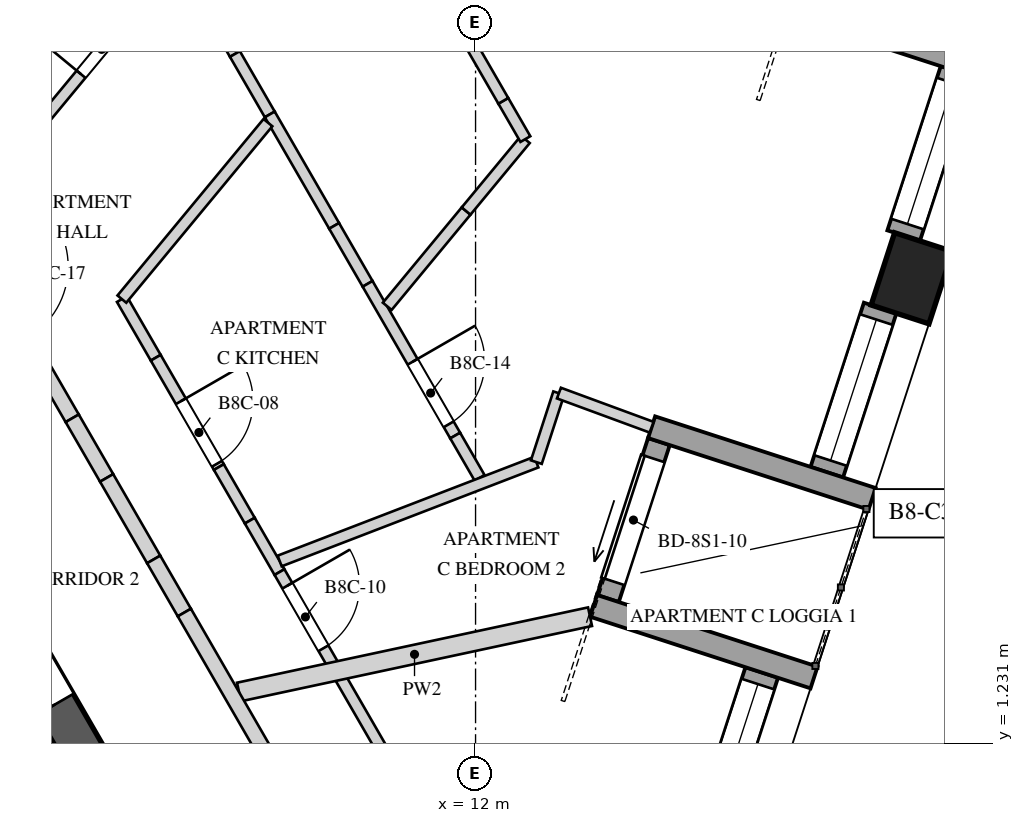
"""IFC4 building model, lengths in metres.
Left out: names, types, materials, properties, quantities, classifications, styles, units other than length and angle.
Written with IfcOpenShell. Run it as: python <this file> out.ifc"""

import sys

from ifc_helpers import new_model, si_unit, direction, frame, frame_2d, origin, origin_2d, place, context, subcontext, project, spatial, polyline, rectangle, outline, extrude, element, fill, save


model = new_model("IFC4")
c1 = context("Model", 3, precision=1e-05, world=origin(), true_north=direction((0.0, 1.0)))
c2 = subcontext(c1, "Body", "Model", "MODEL_VIEW")
j1 = project(units=[si_unit("LENGTHUNIT", "METRE"), si_unit("PLANEANGLEUNIT", "RADIAN")], contexts=[c1])
p1 = place(None, origin())
s1 = spatial("IfcSite", under=j1, at=p1, CompositionType="ELEMENT")
p2 = place(p1, origin())
s2 = spatial("IfcBuilding", under=s1, at=p2, CompositionType="ELEMENT")
p3 = place(p2, frame((0.0, 0.0, 344.4)))
s3 = spatial("IfcBuildingStorey", under=s2, at=p3, CompositionType="ELEMENT", Elevation=344.4)
p4 = place(p3, frame((9.93, -4.25, 0.0), z_axis=(0.0, 0.0, 1.0), x_axis=(-0.499994590896, 0.86602852671, 0.0)))
e1 = element("IfcWall", 1, at=p4, inside=s3, PredefinedType="SHEAR", context=c2, shape_type="SweptSolid", body=[
    extrude(rectangle(XDim=17.292, YDim=0.55, at=frame_2d((8.646, 0.0))), origin(), (0.0, 0.0, 1.0), 4.0),
])
p5 = place(p4, frame((6.921, 0.0, 0.0)))
e2 = element("IfcOpeningElement", 2, at=p5, cuts=e1, PredefinedType="OPENING", context=c2, shape_type="SweptSolid", body=[
    extrude(rectangle(XDim=1.0, YDim=2.4, at=frame_2d((0.5, 1.2))), frame((0.0, 0.285, 0.0), z_axis=(0.0, -1.0, 0.0), x_axis=(1.0, 0.0, 0.0)), (0.0, 0.0, 1.0), 0.57),
])
p6 = place(p3, frame((17.739, 7.349, 0.0), z_axis=(0.0, 0.0, 1.0), x_axis=(0.309016994375, 0.951056516295, 0.0)))
e3 = element("IfcColumn", 3, at=p6, inside=s3, PredefinedType="COLUMN", context=c2, shape_type="SweptSolid", body=[
    extrude(rectangle(XDim=1.0, YDim=0.8, at=origin_2d()), origin(), (0.0, 0.0, 1.0), 4.0),
])
p7 = place(p3, frame((15.063, 0.002, 0.0), z_axis=(0.0, 0.0, 1.0), x_axis=(0.309059334219, 0.951042758204, 0.0)))
e4 = element("IfcWall", 4, at=p7, inside=s3, PredefinedType="SOLIDWALL", context=c2, shape_type="SweptSolid", body=[
    extrude(rectangle(XDim=2.271, YDim=0.45, at=frame_2d((1.135, 0.0))), origin(), (0.0, 0.0, 1.0), 3.3),
])
p8 = place(p7, frame((0.161, 0.0, 0.4)))
e5 = element("IfcOpeningElement", 5, at=p8, cuts=e4, PredefinedType="OPENING", context=c2, shape_type="SweptSolid", body=[
    extrude(rectangle(XDim=1.95, YDim=2.75, at=frame_2d((0.975, 1.375))), frame((0.0, 0.235, 0.0), z_axis=(0.0, -1.0, 0.0), x_axis=(1.0, 0.0, 0.0)), (0.0, 0.0, 1.0), 0.47),
])
p9 = place(p3, frame((16.621, 4.798, 0.0), z_axis=(0.0, 0.0, 1.0), x_axis=(0.309027740273, 0.951053024674, 0.0)))
e6 = element("IfcWall", 6, at=p9, inside=s3, PredefinedType="SOLIDWALL", context=c2, shape_type="SweptSolid", body=[
    extrude(rectangle(XDim=2.271, YDim=0.45, at=frame_2d((1.136, 0.0))), origin(), (0.0, 0.0, 1.0), 3.3),
])
p10 = place(p9, frame((0.161, 0.0, 0.4)))
e7 = element("IfcOpeningElement", 7, at=p10, cuts=e6, PredefinedType="OPENING", context=c2, shape_type="SweptSolid", body=[
    extrude(rectangle(XDim=1.95, YDim=2.1, at=frame_2d((0.975, 1.05))), frame((0.0, 0.235, 0.0), z_axis=(0.0, -1.0, 0.0), x_axis=(1.0, 0.0, 0.0)), (0.0, 0.0, 1.0), 0.47),
])
p11 = place(p3, frame((17.632, 7.909, 0.0), z_axis=(0.0, 0.0, 1.0), x_axis=(0.309027740273, 0.951053024674, 0.0)))
e8 = element("IfcWall", 8, at=p11, inside=s3, PredefinedType="SOLIDWALL", context=c2, shape_type="SweptSolid", body=[
    extrude(rectangle(XDim=2.271, YDim=0.45, at=frame_2d((1.136, 0.0))), origin(), (0.0, 0.0, 1.0), 3.3),
])
p12 = place(p11, frame((0.161, 0.0, 0.4)))
e9 = element("IfcOpeningElement", 9, at=p12, cuts=e8, PredefinedType="OPENING", context=c2, shape_type="SweptSolid", body=[
    extrude(rectangle(XDim=1.95, YDim=2.75, at=frame_2d((0.975, 1.375))), frame((0.0, 0.235, 0.0), z_axis=(0.0, -1.0, 0.0), x_axis=(1.0, 0.0, 0.0)), (0.0, 0.0, 1.0), 0.47),
])
p13 = place(p3, frame((13.741, 3.135, 0.0), z_axis=(0.0, 0.0, 1.0), x_axis=(0.308966581759, 0.95107289487, 0.0)))
e10 = element("IfcWall", 10, at=p13, inside=s3, PredefinedType="SOLIDWALL", context=c2, shape_type="SweptSolid", body=[
    extrude(rectangle(XDim=2.171, YDim=0.3, at=frame_2d((1.086, 0.0))), origin(), (0.0, 0.0, 1.0), 3.3),
])
p14 = place(p13, frame((0.236, 0.0, 0.0)))
e11 = element("IfcOpeningElement", 11, at=p14, cuts=e10, PredefinedType="OPENING", context=c2, shape_type="SweptSolid", body=[
    extrude(rectangle(XDim=1.7, YDim=2.5, at=frame_2d((0.85, 1.25))), frame((0.0, 0.16, 0.0), z_axis=(0.0, -1.0, 0.0), x_axis=(1.0, 0.0, 0.0)), (0.0, 0.0, 1.0), 0.32),
])
for number, where, z_axis, x_axis in (
    (12, (16.453, 2.096, 0.0), (0.0, 0.0, 1.0), (-0.951, 0.309, 0.0)),
    (13, (17.217, 4.447, 0.0), (0.0, 0.0, 1.0), (-0.951, 0.309, 0.0)),
    (14, (19.022, 10.003, 0.0), (0.0, 0.0, 1.0), (-0.951, 0.309, 0.0)),
):
    element("IfcWall", number, at=place(p3, frame(where, z_axis=z_axis, x_axis=x_axis)), inside=s3, PredefinedType="SOLIDWALL", context=c2, shape_type="SweptSolid", body=[
        extrude(rectangle(XDim=3.05, YDim=0.3, at=frame_2d((1.525, 0.0))), origin(), (0.0, 0.0, 1.0), 3.3),
    ])
p15 = place(p3, frame((8.998, -4.135, 0.0), z_axis=(0.0, 0.0, 1.0), x_axis=(-0.500009909098, 0.866019682689, 0.0)))
e15 = element("IfcWall", 15, at=p15, inside=s3, PredefinedType="SOLIDWALL", context=c2, shape_type="SweptSolid", body=[
    extrude(rectangle(XDim=6.2, YDim=0.75, at=frame_2d((3.1, 0.0))), origin(), (0.0, 0.0, 1.0), 3.65),
])
p16 = place(p3, frame((6.12, 9.199, 0.0), z_axis=(0.0, 0.0, 1.0), x_axis=(0.63755942525, 0.770401180733, 0.0)))
e16 = element("IfcWall", 16, at=p16, inside=s3, PredefinedType="PARTITIONING", context=c2, shape_type="SweptSolid", body=[
    extrude(rectangle(XDim=3.014, YDim=0.15, at=frame_2d((1.507, 0.0))), origin(), (0.0, 0.0, 1.0), 3.65),
])
p17 = place(p16, frame((1.082, 0.0, 0.0)))
e17 = element("IfcOpeningElement", 17, at=p17, cuts=e16, PredefinedType="OPENING", context=c2, shape_type="SweptSolid", body=[
    extrude(rectangle(XDim=0.85, YDim=2.4, at=frame_2d((0.425, 1.2))), frame((0.0, 0.085, 0.0), z_axis=(0.0, -1.0, 0.0), x_axis=(1.0, 0.0, 0.0)), (0.0, 0.0, 1.0), 0.17),
])
p18 = place(p3, frame((7.347, 7.074, 0.0), z_axis=(0.0, 0.0, 1.0), x_axis=(0.499944022619, -0.866057719929, 0.0)))
e18 = element("IfcWall", 18, at=p18, inside=s3, PredefinedType="PARTITIONING", context=c2, shape_type="SweptSolid", body=[
    extrude(rectangle(XDim=0.89, YDim=0.15, at=frame_2d((0.445, 0.0))), origin(), (0.0, 0.0, 1.0), 3.65),
])
p19 = place(p3, frame((7.792, 6.303, 0.0), z_axis=(0.0, 0.0, 1.0), x_axis=(0.500027802648, -0.866009351323, 0.0)))
e19 = element("IfcWall", 19, at=p19, inside=s3, PredefinedType="PARTITIONING", context=c2, shape_type="SweptSolid", body=[
    extrude(outline(polyline([(0.0, 0.0), (1.661, 0.0), (1.661, 3.65), (0.881, 3.65), (0.881, 2.55), (0.0, 2.55), (0.0, 0.0)])), frame((0.0, 0.075, 0.0), z_axis=(0.0, -1.0, 0.0), x_axis=(1.0, 0.0, 0.0)), (0.0, 0.0, 1.0), 0.15),
])
p20 = place(p19, frame((0.661, 0.0, 0.0)))
e20 = element("IfcOpeningElement", 20, at=p20, cuts=e19, PredefinedType="OPENING", context=c2, shape_type="SweptSolid", body=[
    extrude(rectangle(XDim=0.95, YDim=2.4, at=frame_2d((0.475, 1.2))), frame((0.0, 0.085, 0.0), z_axis=(0.0, -1.0, 0.0), x_axis=(1.0, 0.0, 0.0)), (0.0, 0.0, 1.0), 0.17),
])
p21 = place(p3, frame((8.623, 4.865, 0.0), z_axis=(0.0, 0.0, 1.0), x_axis=(0.500042693391, -0.866000753341, 0.0)))
e21 = element("IfcWall", 21, at=p21, inside=s3, PredefinedType="PARTITIONING", context=c2, shape_type="SweptSolid", body=[
    extrude(rectangle(XDim=0.814, YDim=0.15, at=frame_2d((0.407, 0.0))), origin(), (0.0, 0.0, 1.0), 3.65),
])
p22 = place(p3, frame((9.03, 4.16, 0.0), z_axis=(0.0, 0.0, 1.0), x_axis=(0.499767520639, -0.866159584207, 0.0)))
e22 = element("IfcWall", 22, at=p22, inside=s3, PredefinedType="PARTITIONING", context=c2, shape_type="SweptSolid", body=[
    extrude(rectangle(XDim=0.781, YDim=0.15, at=frame_2d((0.391, 0.0))), origin(), (0.0, 0.0, 1.0), 2.75),
])
p23 = place(p3, frame((9.42, 3.483, 0.0), z_axis=(0.0, 0.0, 1.0), x_axis=(0.50002680699, -0.866009926209, 0.0)))
e23 = element("IfcWall", 23, at=p23, inside=s3, PredefinedType="PARTITIONING", context=c2, shape_type="SweptSolid", body=[
    extrude(rectangle(XDim=4.12, YDim=0.15, at=frame_2d((2.06, 0.0))), origin(), (0.0, 0.0, 1.0), 3.65),
])
p24 = place(p23, frame((0.207, 0.0, 0.0)))
e24 = element("IfcOpeningElement", 24, at=p24, cuts=e23, PredefinedType="OPENING", context=c2, shape_type="SweptSolid", body=[
    extrude(rectangle(XDim=0.95, YDim=2.4, at=frame_2d((0.475, 1.2))), frame((0.0, 0.085, 0.0), z_axis=(0.0, -1.0, 0.0), x_axis=(1.0, 0.0, 0.0)), (0.0, 0.0, 1.0), 0.17),
])
p25 = place(p3, frame((7.407, 12.771, 0.0), z_axis=(0.0, 0.0, 1.0), x_axis=(0.499966841219, -0.866044547169, 0.0)))
e25 = element("IfcWall", 25, at=p25, inside=s3, PredefinedType="PARTITIONING", context=c2, shape_type="SweptSolid", body=[
    extrude(rectangle(XDim=2.854, YDim=0.15, at=frame_2d((1.427, 0.0))), origin(), (0.0, 0.0, 1.0), 3.65),
])
p26 = place(p3, frame((8.834, 10.299, 0.0), z_axis=(0.0, 0.0, 1.0), x_axis=(0.499945096919, -0.866057099772, 0.0)))
e26 = element("IfcWall", 26, at=p26, inside=s3, PredefinedType="PARTITIONING", context=c2, shape_type="SweptSolid", body=[
    extrude(rectangle(XDim=0.917, YDim=0.15, at=frame_2d((0.459, 0.0))), origin(), (0.0, 0.0, 1.0), 2.55),
])
p27 = place(p3, frame((9.293, 9.504, 0.0), z_axis=(0.0, 0.0, 1.0), x_axis=(0.500046963369, -0.865998287773, 0.0)))
e27 = element("IfcWall", 27, at=p27, inside=s3, PredefinedType="PARTITIONING", context=c2, shape_type="SweptSolid", body=[
    extrude(rectangle(XDim=1.693, YDim=0.15, at=frame_2d((0.847, 0.0))), origin(), (0.0, 0.0, 1.0), 3.65),
])
p28 = place(p3, frame((10.139, 8.038, 0.0), z_axis=(0.0, 0.0, 1.0), x_axis=(0.499866452165, -0.866102493935, 0.0)))
e28 = element("IfcWall", 28, at=p28, inside=s3, PredefinedType="PARTITIONING", context=c2, shape_type="SweptSolid", body=[
    extrude(rectangle(XDim=0.881, YDim=0.15, at=frame_2d((0.44, 0.0))), origin(), (0.0, 0.0, 1.0), 2.55),
])
p29 = place(p3, frame((10.58, 7.275, 0.0), z_axis=(0.0, 0.0, 1.0), x_axis=(0.500012835235, -0.866017993231, 0.0)))
e29 = element("IfcWall", 29, at=p29, inside=s3, PredefinedType="PARTITIONING", context=c2, shape_type="SweptSolid", body=[
    extrude(rectangle(XDim=2.305, YDim=0.15, at=frame_2d((1.152, 0.0))), origin(), (0.0, 0.0, 1.0), 3.65),
])
p30 = place(p29, frame((1.184, 0.0, 0.0)))
e30 = element("IfcOpeningElement", 30, at=p30, cuts=e29, PredefinedType="OPENING", context=c2, shape_type="SweptSolid", body=[
    extrude(rectangle(XDim=0.95, YDim=2.4, at=frame_2d((0.475, 1.2))), frame((0.0, 0.085, 0.0), z_axis=(0.0, -1.0, 0.0), x_axis=(1.0, 0.0, 0.0)), (0.0, 0.0, 1.0), 0.17),
])
p31 = place(p3, frame((11.732, 5.28, 0.0), z_axis=(0.0, 0.0, 1.0), x_axis=(0.500182682664, -0.865919906206, 0.0)))
e31 = element("IfcWall", 31, at=p31, inside=s3, PredefinedType="PARTITIONING", context=c2, shape_type="SweptSolid", body=[
    extrude(rectangle(XDim=0.643, YDim=0.15, at=frame_2d((0.321, 0.0))), origin(), (0.0, 0.0, 1.0), 2.75),
])
p32 = place(p3, frame((8.888, 1.906, 0.0), z_axis=(0.0, 0.0, 1.0), x_axis=(0.977775173816, 0.209656169645, 0.0)))
e32 = element("IfcWall", 32, at=p32, inside=s3, PredefinedType="SOLIDWALL", context=c2, shape_type="SweptSolid", body=[
    extrude(rectangle(XDim=4.723, YDim=0.25, at=frame_2d((2.362, 0.0))), origin(), (0.0, 0.0, 1.0), 3.65),
])
p33 = place(p3, frame((9.269, 9.396, 0.0), z_axis=(0.0, 0.0, 1.0), x_axis=(-0.637511345934, -0.770440967113, 0.0)))
e33 = element("IfcWall", 33, at=p33, inside=s3, PredefinedType="PARTITIONING", context=c2, shape_type="SweptSolid", body=[
    extrude(rectangle(XDim=3.014, YDim=0.15, at=frame_2d((1.507, 0.0))), origin(), (0.0, 0.0, 1.0), 3.65),
])
p34 = place(p3, frame((10.838, 6.98, 0.0), z_axis=(0.0, 0.0, 1.0), x_axis=(0.637509370169, 0.770442601981, 0.0)))
e34 = element("IfcWall", 34, at=p34, inside=s3, PredefinedType="PARTITIONING", context=c2, shape_type="SweptSolid", body=[
    extrude(rectangle(XDim=1.627, YDim=0.15, at=frame_2d((0.813, 0.0))), origin(), (0.0, 0.0, 1.0), 3.65),
])
p35 = place(p3, frame((11.875, 8.233, 0.0), z_axis=(0.0, 0.0, 1.0), x_axis=(0.637588147155, 0.770377410499, 0.0)))
e35 = element("IfcWall", 35, at=p35, inside=s3, PredefinedType="PARTITIONING", context=c2, shape_type="SweptSolid", body=[
    extrude(rectangle(XDim=1.223, YDim=0.15, at=frame_2d((0.611, 0.0))), origin(), (0.0, 0.0, 1.0), 2.55),
])
p36 = place(p3, frame((12.656, 9.18, 0.0), z_axis=(0.0, 0.0, 1.0), x_axis=(-0.500025556299, 0.866010648346, 0.0)))
e36 = element("IfcWall", 36, at=p36, inside=s3, PredefinedType="PARTITIONING", context=c2, shape_type="SweptSolid", body=[
    extrude(rectangle(XDim=0.581, YDim=0.15, at=frame_2d((0.291, 0.0))), origin(), (0.0, 0.0, 1.0), 2.55),
])
p37 = place(p3, frame((12.365, 9.683, 0.0), z_axis=(0.0, 0.0, 1.0), x_axis=(-0.499966648284, 0.866044658551, 0.0)))
e37 = element("IfcWall", 37, at=p37, inside=s3, PredefinedType="PARTITIONING", context=c2, shape_type="SweptSolid", body=[
    extrude(rectangle(XDim=2.25, YDim=0.15, at=frame_2d((1.125, 0.0))), origin(), (0.0, 0.0, 1.0), 3.65),
])
p38 = place(p3, frame((12.8, 4.93, 0.0), z_axis=(0.0, 0.0, 1.0), x_axis=(-0.933173371739, -0.359426568685, 0.0)))
e38 = element("IfcWall", 38, at=p38, inside=s3, PredefinedType="PARTITIONING", context=c2, shape_type="SweptSolid", body=[
    extrude(rectangle(XDim=3.619, YDim=0.15, at=frame_2d((1.81, 0.0))), origin(), (0.0, 0.0, 1.0), 2.75),
])
p39 = place(p3, frame((13.094, 5.837, 0.0), z_axis=(0.0, 0.0, 1.0), x_axis=(-0.309074492062, -0.951037832243, 0.0)))
e39 = element("IfcWall", 39, at=p39, inside=s3, PredefinedType="PARTITIONING", context=c2, shape_type="SweptSolid", body=[
    extrude(rectangle(XDim=0.953, YDim=0.15, at=frame_2d((0.477, 0.0))), origin(), (0.0, 0.0, 1.0), 2.75),
])
p40 = place(p3, frame((14.316, 5.389, 0.0), z_axis=(0.0, 0.0, 1.0), x_axis=(-0.938458564783, 0.345391838621, 0.0)))
e40 = element("IfcWall", 40, at=p40, inside=s3, PredefinedType="PARTITIONING", context=c2, shape_type="SweptSolid", body=[
    extrude(rectangle(XDim=1.299, YDim=0.15, at=frame_2d((0.649, 0.0))), origin(), (0.0, 0.0, 1.0), 2.75),
])
p41 = place(p3, frame((6.29, 6.205, 0.0), z_axis=(0.0, 0.0, 1.0), x_axis=(0.500045602705, -0.86599907345, 0.0)))
e41 = element("IfcWall", 41, at=p41, inside=s3, PredefinedType="SOLIDWALL", context=c2, shape_type="SweptSolid", body=[
    extrude(rectangle(XDim=0.807, YDim=0.2, at=frame_2d((0.403, 0.0))), origin(), (0.0, 0.0, 1.0), 3.65),
])
p42 = place(p3, frame((6.693, 5.507, 0.0), z_axis=(0.0, 0.0, 1.0), x_axis=(0.499994660107, -0.866028486751, 0.0)))
e42 = element("IfcWall", 42, at=p42, inside=s3, PredefinedType="SOLIDWALL", context=c2, shape_type="SweptSolid", body=[
    extrude(rectangle(XDim=0.906, YDim=0.2, at=frame_2d((0.453, 0.0))), origin(), (0.0, 0.0, 1.0), 2.55),
])
p43 = place(p3, frame((7.146, 4.722, 0.0), z_axis=(0.0, 0.0, 1.0), x_axis=(0.499955681623, -0.866050989499, 0.0)))
e43 = element("IfcWall", 43, at=p43, inside=s3, PredefinedType="SOLIDWALL", context=c2, shape_type="SweptSolid", body=[
    extrude(rectangle(XDim=1.238, YDim=0.2, at=frame_2d((0.619, 0.0))), origin(), (0.0, 0.0, 1.0), 3.65),
])
p44 = place(p3, frame((7.765, 3.65, 0.0), z_axis=(0.0, 0.0, 1.0), x_axis=(0.500141487433, -0.865943700565, 0.0)))
e44 = element("IfcWall", 44, at=p44, inside=s3, PredefinedType="SOLIDWALL", context=c2, shape_type="SweptSolid", body=[
    extrude(rectangle(XDim=0.807, YDim=0.2, at=frame_2d((0.403, 0.0))), origin(), (0.0, 0.0, 1.0), 2.75),
])
p45 = place(p3, frame((8.169, 2.951, 0.0), z_axis=(0.0, 0.0, 1.0), x_axis=(0.499959115548, -0.866049007147, 0.0)))
e45 = element("IfcWall", 45, at=p45, inside=s3, PredefinedType="SOLIDWALL", context=c2, shape_type="SweptSolid", body=[
    extrude(rectangle(XDim=3.423, YDim=0.2, at=frame_2d((1.711, 0.0))), origin(), (0.0, 0.0, 1.0), 3.65),
])
p46 = place(p8, origin())
e46 = element("IfcWindow", 46, at=p46, inside=s3, PartitioningType="SINGLE_PANEL", PredefinedType="WINDOW", context=c2, shape_type="SweptSolid", body=[
    extrude(rectangle(XDim=1.95, YDim=2.75, at=frame_2d((0.975, 1.375))), frame((0.0, 0.03, 0.0), z_axis=(0.0, -1.0, 0.0), x_axis=(1.0, 0.0, 0.0)), (0.0, 0.0, 1.0), 0.06),
])
fill(e5, e46)
p47 = place(p10, origin())
e47 = element("IfcWindow", 47, at=p47, inside=s3, PartitioningType="SINGLE_PANEL", PredefinedType="WINDOW", context=c2, shape_type="SweptSolid", body=[
    extrude(rectangle(XDim=1.95, YDim=2.1, at=frame_2d((0.975, 1.05))), frame((0.0, 0.03, 0.0), z_axis=(0.0, -1.0, 0.0), x_axis=(1.0, 0.0, 0.0)), (0.0, 0.0, 1.0), 0.06),
])
fill(e7, e47)
p48 = place(p12, origin())
e48 = element("IfcWindow", 48, at=p48, inside=s3, PartitioningType="SINGLE_PANEL", PredefinedType="WINDOW", context=c2, shape_type="SweptSolid", body=[
    extrude(rectangle(XDim=1.95, YDim=2.75, at=frame_2d((0.975, 1.375))), frame((0.0, 0.03, 0.0), z_axis=(0.0, -1.0, 0.0), x_axis=(1.0, 0.0, 0.0)), (0.0, 0.0, 1.0), 0.06),
])
fill(e9, e48)
p49 = place(p14, origin())
e49 = element("IfcDoor", 49, at=p49, inside=s3, OperationType="SLIDING_TO_LEFT", PredefinedType="DOOR", context=c2, shape_type="SweptSolid", body=[
    extrude(rectangle(XDim=1.7, YDim=2.5, at=frame_2d((0.85, 1.25))), frame((0.0, 0.025, 0.0), z_axis=(0.0, -1.0, 0.0), x_axis=(1.0, 0.0, 0.0)), (0.0, 0.0, 1.0), 0.05),
])
fill(e11, e49)
p50 = place(p5, origin())
e50 = element("IfcDoor", 50, at=p50, inside=s3, OperationType="SINGLE_SWING_RIGHT", PredefinedType="DOOR", context=c2, shape_type="SweptSolid", body=[
    extrude(rectangle(XDim=1.0, YDim=2.4, at=frame_2d((0.5, 1.2))), frame((0.0, 0.025, 0.0), z_axis=(0.0, -1.0, 0.0), x_axis=(1.0, 0.0, 0.0)), (0.0, 0.0, 1.0), 0.05),
])
fill(e2, e50)
p51 = place(p20, origin())
e51 = element("IfcDoor", 51, at=p51, inside=s3, OperationType="SINGLE_SWING_RIGHT", PredefinedType="DOOR", context=c2, shape_type="SweptSolid", body=[
    extrude(rectangle(XDim=0.95, YDim=2.4, at=frame_2d((0.475, 1.2))), frame((0.0, 0.025, 0.0), z_axis=(0.0, -1.0, 0.0), x_axis=(1.0, 0.0, 0.0)), (0.0, 0.0, 1.0), 0.05),
])
fill(e20, e51)
p52 = place(p17, origin())
e52 = element("IfcDoor", 52, at=p52, inside=s3, OperationType="SINGLE_SWING_LEFT", PredefinedType="DOOR", context=c2, shape_type="SweptSolid", body=[
    extrude(rectangle(XDim=0.85, YDim=2.4, at=frame_2d((0.425, 1.2))), frame((0.0, 0.025, 0.0), z_axis=(0.0, -1.0, 0.0), x_axis=(1.0, 0.0, 0.0)), (0.0, 0.0, 1.0), 0.05),
])
fill(e17, e52)
p53 = place(p24, origin())
e53 = element("IfcDoor", 53, at=p53, inside=s3, OperationType="SINGLE_SWING_RIGHT", PredefinedType="DOOR", context=c2, shape_type="SweptSolid", body=[
    extrude(rectangle(XDim=0.95, YDim=2.4, at=frame_2d((0.475, 1.2))), frame((0.0, 0.025, 0.0), z_axis=(0.0, -1.0, 0.0), x_axis=(1.0, 0.0, 0.0)), (0.0, 0.0, 1.0), 0.05),
])
fill(e24, e53)
p54 = place(p30, origin())
e54 = element("IfcDoor", 54, at=p54, inside=s3, OperationType="SINGLE_SWING_RIGHT", PredefinedType="DOOR", context=c2, shape_type="SweptSolid", body=[
    extrude(rectangle(XDim=0.95, YDim=2.4, at=frame_2d((0.475, 1.2))), frame((0.0, 0.025, 0.0), z_axis=(0.0, -1.0, 0.0), x_axis=(1.0, 0.0, 0.0)), (0.0, 0.0, 1.0), 0.05),
])
fill(e30, e54)
save(model, sys.argv[1])
